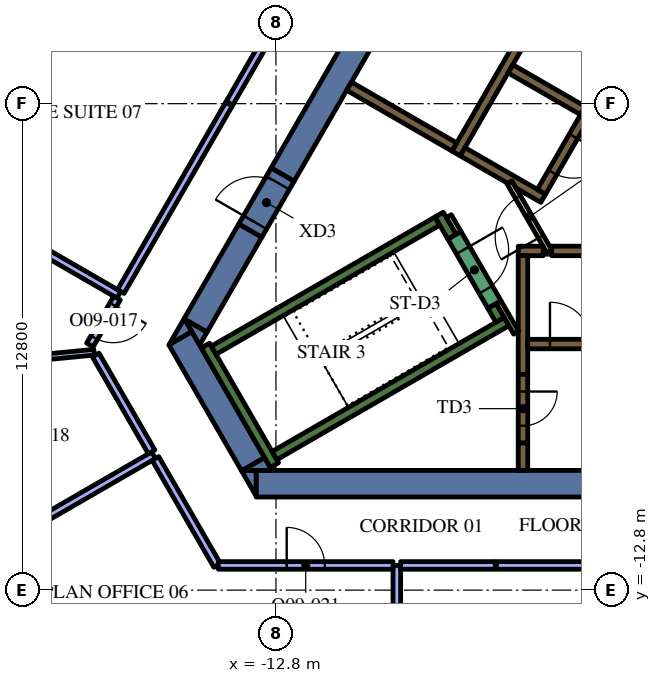
"""IFC4 building model, lengths in metres.
Left out: names, types, materials, properties, quantities, classifications, styles, units other than length and angle.
Written with IfcOpenShell. Run it as: python <this file> out.ifc"""

import sys

from ifc_helpers import new_model, si_unit, direction, frame, frame_2d, origin, place, context, subcontext, project, spatial, polyline, rectangle, outline, extrude, element, fill, save


model = new_model("IFC4")
c1 = context("Model", 3, precision=1e-05, world=origin(), true_north=direction((0.0, 1.0)))
c2 = subcontext(c1, "Body", "Model", "MODEL_VIEW")
j1 = project(units=[si_unit("LENGTHUNIT", "METRE"), si_unit("PLANEANGLEUNIT", "RADIAN")], contexts=[c1])
p1 = place(None, origin())
s1 = spatial("IfcSite", under=j1, at=p1, CompositionType="ELEMENT")
p2 = place(p1, origin())
s2 = spatial("IfcBuilding", under=s1, at=p2, CompositionType="ELEMENT")
p3 = place(p2, frame((0.0, 0.0, 239.4)))
s3 = spatial("IfcBuildingStorey", under=s2, at=p3, CompositionType="ELEMENT", Elevation=239.4)
p4 = place(p3, frame((8.904, -10.0, 0.0), z_axis=(0.0, 0.0, 1.0), x_axis=(-1.0, 0.0, 0.0)))
e1 = element("IfcWall", 1, at=p4, inside=s3, PredefinedType="SOLIDWALL", context=c2, shape_type="SweptSolid", body=[
    extrude(rectangle(XDim=22.226, YDim=0.7, at=frame_2d((11.113, 0.0))), origin(), (0.0, 0.0, 1.0), 4.2),
])
p5 = place(p3, origin())
e2 = element("IfcWall", 2, at=p5, inside=s3, PredefinedType="SOLIDWALL", context=c2, shape_type="SweptSolid", body=[
    extrude(outline(polyline([(-13.712, -9.65), (-13.324, -9.65), (-13.324, -10.322), (-13.712, -9.65)])), origin(), (0.0, 0.0, 1.0), 4.2),
])
p6 = place(p3, frame((-13.402, -9.487, 0.0), z_axis=(0.0, 0.0, 1.0), x_axis=(-0.500020498207, 0.866013568815, 0.0)))
e3 = element("IfcWall", 3, at=p6, inside=s3, PredefinedType="SOLIDWALL", context=c2, shape_type="SweptSolid", body=[
    extrude(rectangle(XDim=3.829, YDim=0.7, at=frame_2d((1.915, 0.0))), origin(), (0.0, 0.0, 1.0), 4.2),
])
e4 = element("IfcWall", 4, at=p5, inside=s3, PredefinedType="SOLIDWALL", context=c2, shape_type="SweptSolid", body=[
    extrude(outline(polyline([(-15.014, -5.995), (-15.611, -6.339), (-15.213, -5.65), (-15.014, -5.995)])), origin(), (0.0, 0.0, 1.0), 4.2),
])
e5 = element("IfcWall", 5, at=p5, inside=s3, PredefinedType="SOLIDWALL", context=c2, shape_type="SweptSolid", body=[
    extrude(outline(polyline([(-12.904, -9.65), (-13.68, -9.65), (-13.098, -9.314), (-12.904, -9.65)])), origin(), (0.0, 0.0, 1.0), 4.2),
])
p7 = place(p3, frame((-13.475, -3.339, 0.0), z_axis=(0.0, 0.0, 1.0), x_axis=(-0.499944726303, -0.866057313716, 0.0)))
e6 = element("IfcWall", 6, at=p7, inside=s3, PredefinedType="SOLIDWALL", context=c2, shape_type="SweptSolid", body=[
    extrude(rectangle(XDim=2.884, YDim=0.7, at=frame_2d((1.442, 0.0))), origin(), (0.0, 0.0, 1.0), 4.2),
])
e7 = element("IfcWall", 7, at=p5, inside=s3, PredefinedType="SOLIDWALL", context=c2, shape_type="SweptSolid", body=[
    extrude(outline(polyline([(-14.809, -6.35), (-15.197, -5.678), (-14.615, -6.014), (-14.809, -6.35)])), origin(), (0.0, 0.0, 1.0), 4.2),
])
p8 = place(p3, frame((-12.625, -1.867, 0.0), z_axis=(0.0, 0.0, 1.0), x_axis=(0.500008520515, 0.866020484407, 0.0)))
e8 = element("IfcWall", 8, at=p8, inside=s3, PredefinedType="SOLIDWALL", context=c2, shape_type="SweptSolid", body=[
    extrude(rectangle(XDim=15.859, YDim=0.7, at=frame_2d((7.929, 0.0))), origin(), (0.0, 0.0, 1.0), 4.2),
])
p9 = place(p3, frame((-12.84, -9.511, 0.0), z_axis=(0.0, 0.0, 1.0), x_axis=(-0.499997733992, 0.866026712061, 0.0)))
e9 = element("IfcWall", 9, at=p9, inside=s3, PredefinedType="SOLIDWALL", context=c2, shape_type="SweptSolid", body=[
    extrude(rectangle(XDim=3.634, YDim=0.25, at=frame_2d((1.817, 0.0))), origin(), (0.0, 0.0, 1.0), 4.2),
])
p10 = place(p3, frame((-14.44, -6.49, 0.0), z_axis=(0.0, 0.0, 1.0), x_axis=(0.866022966069, 0.500004222222, 0.0)))
e10 = element("IfcWall", 10, at=p10, inside=s3, PredefinedType="SOLIDWALL", context=c2, shape_type="SweptSolid", body=[
    extrude(rectangle(XDim=6.8, YDim=0.25, at=frame_2d((3.4, 0.0))), origin(), (0.0, 0.0, 1.0), 4.2),
])
p11 = place(p3, frame((-8.168, -3.503, 0.0), z_axis=(0.0, 0.0, 1.0), x_axis=(-0.499952099219, 0.866053057547, 0.0)))
e11 = element("IfcWall", 11, at=p11, inside=s3, PredefinedType="SOLIDWALL", context=c2, shape_type="SweptSolid", body=[
    extrude(rectangle(XDim=0.675, YDim=0.25, at=frame_2d((0.337, 0.0))), origin(), (0.0, 0.0, 1.0), 4.2),
])
p12 = place(p3, frame((-12.84, -9.261, 0.0), z_axis=(0.0, 0.0, 1.0), x_axis=(0.866016039709, 0.500016218704, 0.0)))
e12 = element("IfcWall", 12, at=p12, inside=s3, PredefinedType="SOLIDWALL", context=c2, shape_type="SweptSolid", body=[
    extrude(rectangle(XDim=7.05, YDim=0.25, at=frame_2d((3.525, 0.0))), origin(), (0.0, 0.0, 1.0), 4.2),
])
p13 = place(p3, frame((-6.905, -5.69, 0.0), z_axis=(0.0, 0.0, 1.0), x_axis=(-0.500402024738, 0.865793170242, 0.0)))
e13 = element("IfcWall", 13, at=p13, inside=s3, PredefinedType="SOLIDWALL", context=c2, shape_type="SweptSolid", body=[
    extrude(rectangle(XDim=0.425, YDim=0.25, at=frame_2d((0.212, 0.0))), origin(), (0.0, 0.0, 1.0), 4.2),
])
p14 = place(p3, frame((-6.3, -8.925, 0.0), z_axis=(0.0, 0.0, 1.0), x_axis=(0.0, -1.0, 0.0)))
e14 = element("IfcWall", 14, at=p14, inside=s3, PredefinedType="SOLIDWALL", context=c2, shape_type="SweptSolid", body=[
    extrude(rectangle(XDim=0.725, YDim=0.25, at=frame_2d((0.363, 0.0))), origin(), (0.0, 0.0, 1.0), 4.2),
])
p15 = place(p3, frame((-5.545, -3.875, 0.0), z_axis=(0.0, 0.0, 1.0), x_axis=(1.0, 0.0, 0.0)))
e15 = element("IfcWall", 15, at=p15, inside=s3, PredefinedType="SOLIDWALL", context=c2, shape_type="SweptSolid", body=[
    extrude(rectangle(XDim=11.97, YDim=0.25, at=frame_2d((5.985, 0.0))), origin(), (0.0, 0.0, 1.0), 4.2),
])
p16 = place(p3, frame((-6.425, -3.875, 0.0), z_axis=(0.0, 0.0, 1.0), x_axis=(1.0, 0.0, 0.0)))
e16 = element("IfcWall", 16, at=p16, inside=s3, PredefinedType="SOLIDWALL", context=c2, shape_type="SweptSolid", body=[
    extrude(rectangle(XDim=0.658, YDim=0.25, at=frame_2d((0.329, 0.0))), origin(), (0.0, 0.0, 1.0), 4.2),
])
p17 = place(p3, frame((-6.3, -7.125, 0.0), z_axis=(0.0, 0.0, 1.0), x_axis=(0.0, 1.0, 0.0)))
e17 = element("IfcWall", 17, at=p17, inside=s3, PredefinedType="SOLIDWALL", context=c2, shape_type="SweptSolid", body=[
    extrude(rectangle(XDim=3.125, YDim=0.25, at=frame_2d((1.562, 0.0))), origin(), (0.0, 0.0, 1.0), 4.2),
])
p18 = place(p3, frame((-8.06, -1.311, 0.0), z_axis=(0.0, 0.0, 1.0), x_axis=(0.50000273126, 0.866023826885, 0.0)))
e18 = element("IfcWall", 18, at=p18, inside=s3, PredefinedType="SOLIDWALL", context=c2, shape_type="SweptSolid", body=[
    extrude(rectangle(XDim=10.33, YDim=0.25, at=frame_2d((5.165, 0.0))), origin(), (0.0, 0.0, 1.0), 4.2),
])
p19 = place(p3, frame((-4.724, -0.182, 0.0), z_axis=(0.0, 0.0, 1.0), x_axis=(-0.866008176907, 0.50002983664, 0.0)))
e19 = element("IfcWall", 19, at=p19, inside=s3, PredefinedType="SOLIDWALL", context=c2, shape_type="SweptSolid", body=[
    extrude(rectangle(XDim=2.2, YDim=0.25, at=frame_2d((1.1, 0.0))), origin(), (0.0, 0.0, 1.0), 4.2),
])
e20 = element("IfcWall", 20, at=p5, inside=s3, PredefinedType="SOLIDWALL", context=c2, shape_type="SweptSolid", body=[
    extrude(outline(polyline([(-5.922, -2.257), (-5.922, -2.257), (-5.705, -2.382), (-5.83, -2.598), (-6.483, -2.221), (-6.591, -2.033), (-6.591, -2.033), (-6.7, -2.096), (-7.952, -1.373), (-7.827, -1.156), (-5.922, -2.257)])), origin(), (0.0, 0.0, 1.0), 4.2),
])
p20 = place(p3, frame((-8.106, -1.14, 0.0), z_axis=(0.0, 0.0, 1.0), x_axis=(-0.866008981251, 0.500028443584, 0.0)))
e21 = element("IfcWall", 21, at=p20, inside=s3, PredefinedType="SOLIDWALL", context=c2, shape_type="SweptSolid", body=[
    extrude(rectangle(XDim=3.2, YDim=0.25, at=frame_2d((1.6, 0.0))), origin(), (0.0, 0.0, 1.0), 4.2),
])
p21 = place(p3, frame((-8.252, -2.958, 0.0), z_axis=(0.0, 0.0, 1.0), x_axis=(0.500174715838, -0.865924508047, 0.0)))
e22 = element("IfcWall", 22, at=p21, inside=s3, PredefinedType="PARTITIONING", context=c2, shape_type="SweptSolid", body=[
    extrude(rectangle(XDim=0.514, YDim=0.15, at=frame_2d((0.257, 0.0))), origin(), (0.0, 0.0, 1.0), 3.45),
])
p22 = place(p3, frame((-6.48, -6.027, 0.0), z_axis=(0.0, 0.0, 1.0), x_axis=(-0.499927229454, 0.866067413802, 0.0)))
e23 = element("IfcWall", 23, at=p22, inside=s3, PredefinedType="PARTITIONING", context=c2, shape_type="SweptSolid", body=[
    extrude(rectangle(XDim=0.929, YDim=0.15, at=frame_2d((0.464, 0.0))), origin(), (0.0, 0.0, 1.0), 4.2),
])
p23 = place(p3, frame((-6.175, -6.325, 0.0), z_axis=(0.0, 0.0, 1.0), x_axis=(1.0, 0.0, 0.0)))
e24 = element("IfcWall", 24, at=p23, inside=s3, PredefinedType="SOLIDWALL", context=c2, shape_type="SweptSolid", body=[
    extrude(rectangle(XDim=12.35, YDim=0.25, at=frame_2d((6.175, 0.0))), origin(), (0.0, 0.0, 1.0), 4.2),
])
p24 = place(p23, frame((0.585, 0.0, 0.0)))
e25 = element("IfcOpeningElement", 25, at=p24, cuts=e24, PredefinedType="OPENING", context=c2, shape_type="SweptSolid", body=[
    extrude(rectangle(XDim=1.1, YDim=2.1, at=frame_2d((0.55, 1.05))), frame((0.0, 0.135, 0.0), z_axis=(0.0, -1.0, 0.0), x_axis=(1.0, 0.0, 0.0)), (0.0, 0.0, 1.0), 0.27),
])
p25 = place(p23, frame((3.105, 0.0, 0.0)))
e26 = element("IfcOpeningElement", 26, at=p25, cuts=e24, PredefinedType="OPENING", context=c2, shape_type="SweptSolid", body=[
    extrude(rectangle(XDim=1.1, YDim=2.1, at=frame_2d((0.55, 1.05))), frame((0.0, 0.135, 0.0), z_axis=(0.0, -1.0, 0.0), x_axis=(1.0, 0.0, 0.0)), (0.0, 0.0, 1.0), 0.27),
])
p26 = place(p23, frame((5.625, 0.0, 0.0)))
e27 = element("IfcOpeningElement", 27, at=p26, cuts=e24, PredefinedType="OPENING", context=c2, shape_type="SweptSolid", body=[
    extrude(rectangle(XDim=1.1, YDim=2.1, at=frame_2d((0.55, 1.05))), frame((0.0, 0.135, 0.0), z_axis=(0.0, -1.0, 0.0), x_axis=(1.0, 0.0, 0.0)), (0.0, 0.0, 1.0), 0.27),
])
p27 = place(p23, frame((8.145, 0.0, 0.0)))
e28 = element("IfcOpeningElement", 28, at=p27, cuts=e24, PredefinedType="OPENING", context=c2, shape_type="SweptSolid", body=[
    extrude(rectangle(XDim=1.1, YDim=2.1, at=frame_2d((0.55, 1.05))), frame((0.0, 0.135, 0.0), z_axis=(0.0, -1.0, 0.0), x_axis=(1.0, 0.0, 0.0)), (0.0, 0.0, 1.0), 0.27),
])
p28 = place(p23, frame((10.665, 0.0, 0.0)))
e29 = element("IfcOpeningElement", 29, at=p28, cuts=e24, PredefinedType="OPENING", context=c2, shape_type="SweptSolid", body=[
    extrude(rectangle(XDim=1.1, YDim=2.1, at=frame_2d((0.55, 1.05))), frame((0.0, 0.135, 0.0), z_axis=(0.0, -1.0, 0.0), x_axis=(1.0, 0.0, 0.0)), (0.0, 0.0, 1.0), 0.27),
])
p29 = place(p3, frame((-0.898, 6.194, 0.0), z_axis=(0.0, 0.0, 1.0), x_axis=(-0.499996202215, -0.866027596426, 0.0)))
e30 = element("IfcWall", 30, at=p29, inside=s3, PredefinedType="SOLIDWALL", context=c2, shape_type="SweptSolid", body=[
    extrude(rectangle(XDim=9.83, YDim=0.25, at=frame_2d((4.915, 0.0))), origin(), (0.0, 0.0, 1.0), 4.2),
])
p30 = place(p29, frame((0.585, 0.0, 0.0)))
e31 = element("IfcOpeningElement", 31, at=p30, cuts=e30, PredefinedType="OPENING", context=c2, shape_type="SweptSolid", body=[
    extrude(rectangle(XDim=1.1, YDim=2.1, at=frame_2d((0.55, 1.05))), frame((0.0, 0.135, 0.0), z_axis=(0.0, -1.0, 0.0), x_axis=(1.0, 0.0, 0.0)), (0.0, 0.0, 1.0), 0.27),
])
p31 = place(p29, frame((3.105, 0.0, 0.0)))
e32 = element("IfcOpeningElement", 32, at=p31, cuts=e30, PredefinedType="OPENING", context=c2, shape_type="SweptSolid", body=[
    extrude(rectangle(XDim=1.1, YDim=2.1, at=frame_2d((0.55, 1.05))), frame((0.0, 0.135, 0.0), z_axis=(0.0, -1.0, 0.0), x_axis=(1.0, 0.0, 0.0)), (0.0, 0.0, 1.0), 0.27),
])
p32 = place(p29, frame((5.625, 0.0, 0.0)))
e33 = element("IfcOpeningElement", 33, at=p32, cuts=e30, PredefinedType="OPENING", context=c2, shape_type="SweptSolid", body=[
    extrude(rectangle(XDim=1.1, YDim=2.1, at=frame_2d((0.55, 1.05))), frame((0.0, 0.135, 0.0), z_axis=(0.0, -1.0, 0.0), x_axis=(1.0, 0.0, 0.0)), (0.0, 0.0, 1.0), 0.27),
])
p33 = place(p29, frame((8.145, 0.0, 0.0)))
e34 = element("IfcOpeningElement", 34, at=p33, cuts=e30, PredefinedType="OPENING", context=c2, shape_type="SweptSolid", body=[
    extrude(rectangle(XDim=1.1, YDim=2.1, at=frame_2d((0.55, 1.05))), frame((0.0, 0.135, 0.0), z_axis=(0.0, -1.0, 0.0), x_axis=(1.0, 0.0, 0.0)), (0.0, 0.0, 1.0), 0.27),
])
p34 = place(p3, frame((-8.103, -3.466, 0.0), z_axis=(0.0, 0.0, 1.0), x_axis=(0.500078061341, -0.865980330357, 0.0)))
e35 = element("IfcWall", 35, at=p34, inside=s3, PredefinedType="SOLIDWALL", context=c2, shape_type="SweptSolid", body=[
    extrude(rectangle(XDim=2.1, YDim=0.4, at=frame_2d((1.05, 0.0))), origin(), (0.0, 0.0, 1.0), 4.2),
])
p35 = place(p34, frame((0.45, 0.0, 0.0)))
e36 = element("IfcOpeningElement", 36, at=p35, cuts=e35, PredefinedType="OPENING", context=c2, shape_type="SweptSolid", body=[
    extrude(rectangle(XDim=1.2, YDim=2.1, at=frame_2d((0.6, 1.05))), frame((0.0, 0.21, 0.0), z_axis=(0.0, -1.0, 0.0), x_axis=(1.0, 0.0, 0.0)), (0.0, 0.0, 1.0), 0.42),
])
p36 = place(p3, frame((-6.3, -7.125, 0.0), z_axis=(0.0, 0.0, 1.0), x_axis=(0.0, -1.0, 0.0)))
e37 = element("IfcWall", 37, at=p36, inside=s3, PredefinedType="SOLIDWALL", context=c2, shape_type="SweptSolid", body=[
    extrude(rectangle(XDim=1.8, YDim=0.25, at=frame_2d((0.9, 0.0))), origin(), (0.0, 0.0, 1.0), 4.2),
])
p37 = place(p36, frame((0.45, 0.0, 0.0)))
e38 = element("IfcOpeningElement", 38, at=p37, cuts=e37, PredefinedType="OPENING", context=c2, shape_type="SweptSolid", body=[
    extrude(rectangle(XDim=0.9, YDim=2.1, at=frame_2d((0.45, 1.05))), frame((0.0, 0.135, 0.0), z_axis=(0.0, -1.0, 0.0), x_axis=(1.0, 0.0, 0.0)), (0.0, 0.0, 1.0), 0.27),
])
p38 = place(p3, frame((-5.606, -3.89, 0.0), z_axis=(0.0, 0.0, 1.0), x_axis=(-0.500027713859, 0.866009402589, 0.0)))
e39 = element("IfcWall", 39, at=p38, inside=s3, PredefinedType="PARTITIONING", context=c2, shape_type="SweptSolid", body=[
    extrude(rectangle(XDim=2.1, YDim=0.15, at=frame_2d((1.05, 0.0))), origin(), (0.0, 0.0, 1.0), 3.45),
])
p39 = place(p38, frame((0.45, 0.0, 0.0)))
e40 = element("IfcOpeningElement", 40, at=p39, cuts=e39, PredefinedType="OPENING", context=c2, shape_type="SweptSolid", body=[
    extrude(rectangle(XDim=1.2, YDim=2.1, at=frame_2d((0.6, 1.05))), frame((0.0, 0.085, 0.0), z_axis=(0.0, -1.0, 0.0), x_axis=(1.0, 0.0, 0.0)), (0.0, 0.0, 1.0), 0.17),
])
p40 = place(p3, frame((-13.475, -3.339, 0.0), z_axis=(0.0, 0.0, 1.0), x_axis=(0.499954529098, 0.86605165483, 0.0)))
e41 = element("IfcWall", 41, at=p40, inside=s3, PredefinedType="SOLIDWALL", context=c2, shape_type="SweptSolid", body=[
    extrude(rectangle(XDim=1.7, YDim=0.7, at=frame_2d((0.85, 0.0))), origin(), (0.0, 0.0, 1.0), 4.2),
])
p41 = place(p40, frame((0.25, 0.0, 0.0)))
e42 = element("IfcOpeningElement", 42, at=p41, cuts=e41, PredefinedType="OPENING", context=c2, shape_type="SweptSolid", body=[
    extrude(rectangle(XDim=1.2, YDim=2.1, at=frame_2d((0.6, 1.05))), frame((0.0, 0.36, 0.0), z_axis=(0.0, -1.0, 0.0), x_axis=(1.0, 0.0, 0.0)), (0.0, 0.0, 1.0), 0.72),
])
p42 = place(p3, frame((-9.62, -15.654, 0.0), z_axis=(0.0, 0.0, 1.0), x_axis=(0.0, 1.0, 0.0)))
e43 = element("IfcWall", 43, at=p42, inside=s3, PredefinedType="PARTITIONING", context=c2, shape_type="SweptSolid", body=[
    extrude(rectangle(XDim=3.504, YDim=0.2, at=frame_2d((1.752, 0.0))), origin(), (0.0, 0.0, 1.0), 3.45),
])
p43 = place(p3, frame((-7.0, -12.15, 0.0), z_axis=(0.0, 0.0, 1.0), x_axis=(1.0, 0.0, 0.0)))
e44 = element("IfcWall", 44, at=p43, inside=s3, PredefinedType="PARTITIONING", context=c2, shape_type="SweptSolid", body=[
    extrude(rectangle(XDim=14.0, YDim=0.2, at=frame_2d((7.0, 0.0))), origin(), (0.0, 0.0, 1.0), 3.45),
])
p44 = place(p43, frame((6.5, 0.0, 0.0)))
e45 = element("IfcOpeningElement", 45, at=p44, cuts=e44, PredefinedType="OPENING", context=c2, shape_type="SweptSolid", body=[
    extrude(rectangle(XDim=1.0, YDim=2.1, at=frame_2d((0.5, 1.05))), frame((0.0, 0.11, 0.0), z_axis=(0.0, -1.0, 0.0), x_axis=(1.0, 0.0, 0.0)), (0.0, 0.0, 1.0), 0.22),
])
p45 = place(p3, frame((-9.52, -12.15, 0.0), z_axis=(0.0, 0.0, 1.0), x_axis=(1.0, 0.0, 0.0)))
e46 = element("IfcWall", 46, at=p45, inside=s3, PredefinedType="PARTITIONING", context=c2, shape_type="SweptSolid", body=[
    extrude(rectangle(XDim=2.49, YDim=0.2, at=frame_2d((1.245, 0.0))), origin(), (0.0, 0.0, 1.0), 3.45),
])
p46 = place(p3, frame((-16.934, -5.03, 0.0), z_axis=(0.0, 0.0, 1.0), x_axis=(-0.866031916153, 0.499988720078, 0.0)))
e47 = element("IfcWall", 47, at=p46, inside=s3, PredefinedType="PARTITIONING", context=c2, shape_type="SweptSolid", body=[
    extrude(rectangle(XDim=3.492, YDim=0.2, at=frame_2d((1.746, 0.0))), origin(), (0.0, 0.0, 1.0), 3.45),
])
p47 = place(p3, frame((-7.364, 11.545, 0.0), z_axis=(0.0, 0.0, 1.0), x_axis=(-0.500001759768, -0.86602438778, 0.0)))
e48 = element("IfcWall", 48, at=p47, inside=s3, PredefinedType="PARTITIONING", context=c2, shape_type="SweptSolid", body=[
    extrude(rectangle(XDim=13.317, YDim=0.2, at=frame_2d((6.658, 0.0))), origin(), (0.0, 0.0, 1.0), 3.45),
])
p48 = place(p47, frame((6.2, 0.0, 0.0)))
e49 = element("IfcOpeningElement", 49, at=p48, cuts=e48, PredefinedType="OPENING", context=c2, shape_type="SweptSolid", body=[
    extrude(rectangle(XDim=1.0, YDim=2.1, at=frame_2d((0.5, 1.05))), frame((0.0, 0.11, 0.0), z_axis=(0.0, -1.0, 0.0), x_axis=(1.0, 0.0, 0.0)), (0.0, 0.0, 1.0), 0.22),
])
p49 = place(p3, frame((-14.037, -0.013, 0.0), z_axis=(0.0, 0.0, 1.0), x_axis=(-0.500018205831, -0.866014892388, 0.0)))
e50 = element("IfcWall", 50, at=p49, inside=s3, PredefinedType="PARTITIONING", context=c2, shape_type="SweptSolid", body=[
    extrude(rectangle(XDim=5.693, YDim=0.2, at=frame_2d((2.846, 0.0))), origin(), (0.0, 0.0, 1.0), 3.45),
])
p50 = place(p3, frame((-17.586, -6.54, 0.0), z_axis=(0.0, 0.0, 1.0), x_axis=(-0.995356357863, -0.096258614479, 0.0)))
e51 = element("IfcWall", 51, at=p50, inside=s3, PredefinedType="PARTITIONING", context=c2, shape_type="SweptSolid", body=[
    extrude(rectangle(XDim=3.926, YDim=0.15, at=frame_2d((1.963, 0.0))), origin(), (0.0, 0.0, 1.0), 3.45),
])
p51 = place(p50, frame((1.3, 0.0, 0.0)))
e52 = element("IfcOpeningElement", 52, at=p51, cuts=e51, PredefinedType="OPENING", context=c2, shape_type="SweptSolid", body=[
    extrude(rectangle(XDim=0.9, YDim=2.1, at=frame_2d((0.45, 1.05))), frame((0.0, 0.085, 0.0), z_axis=(0.0, -1.0, 0.0), x_axis=(1.0, 0.0, 0.0)), (0.0, 0.0, 1.0), 0.17),
])
p52 = place(p3, frame((-16.983, -5.116, 0.0), z_axis=(0.0, 0.0, 1.0), x_axis=(-0.500009219579, -0.866020080793, 0.0)))
e53 = element("IfcWall", 53, at=p52, inside=s3, PredefinedType="PARTITIONING", context=c2, shape_type="SweptSolid", body=[
    extrude(rectangle(XDim=1.425, YDim=0.2, at=frame_2d((0.712, 0.0))), origin(), (0.0, 0.0, 1.0), 3.45),
])
p53 = place(p52, frame((0.2, 0.0, 0.0)))
e54 = element("IfcOpeningElement", 54, at=p53, cuts=e53, PredefinedType="OPENING", context=c2, shape_type="SweptSolid", body=[
    extrude(rectangle(XDim=1.0, YDim=2.1, at=frame_2d((0.5, 1.05))), frame((0.0, 0.11, 0.0), z_axis=(0.0, -1.0, 0.0), x_axis=(1.0, 0.0, 0.0)), (0.0, 0.0, 1.0), 0.22),
])
p54 = place(p3, frame((-16.021, -9.25, 0.0), z_axis=(0.0, 0.0, 1.0), x_axis=(-0.86602692059, -0.499997372806, 0.0)))
e55 = element("IfcWall", 55, at=p54, inside=s3, PredefinedType="PARTITIONING", context=c2, shape_type="SweptSolid", body=[
    extrude(rectangle(XDim=6.765, YDim=0.2, at=frame_2d((3.382, 0.0))), origin(), (0.0, 0.0, 1.0), 3.45),
])
p55 = place(p3, frame((-17.545, -6.612, 0.0), z_axis=(0.0, 0.0, 1.0), x_axis=(0.500006981563, -0.86602137294, 0.0)))
e56 = element("IfcWall", 56, at=p55, inside=s3, PredefinedType="PARTITIONING", context=c2, shape_type="SweptSolid", body=[
    extrude(rectangle(XDim=2.946, YDim=0.2, at=frame_2d((1.473, 0.0))), origin(), (0.0, 0.0, 1.0), 3.45),
])
p56 = place(p3, frame((-15.971, -9.337, 0.0), z_axis=(0.0, 0.0, 1.0), x_axis=(0.500010870188, -0.866019127788, 0.0)))
e57 = element("IfcWall", 57, at=p56, inside=s3, PredefinedType="PARTITIONING", context=c2, shape_type="SweptSolid", body=[
    extrude(rectangle(XDim=3.249, YDim=0.2, at=frame_2d((1.624, 0.0))), origin(), (0.0, 0.0, 1.0), 3.45),
])
p57 = place(p3, frame((-14.317, -12.15, 0.0), z_axis=(0.0, 0.0, 1.0), x_axis=(1.0, 0.0, 0.0)))
e58 = element("IfcWall", 58, at=p57, inside=s3, PredefinedType="PARTITIONING", context=c2, shape_type="SweptSolid", body=[
    extrude(rectangle(XDim=4.597, YDim=0.2, at=frame_2d((2.299, 0.0))), origin(), (0.0, 0.0, 1.0), 3.45),
])
p58 = place(p57, frame((1.8, 0.0, 0.0)))
e59 = element("IfcOpeningElement", 59, at=p58, cuts=e58, PredefinedType="OPENING", context=c2, shape_type="SweptSolid", body=[
    extrude(rectangle(XDim=1.0, YDim=2.1, at=frame_2d((0.5, 1.05))), frame((0.0, 0.11, 0.0), z_axis=(0.0, -1.0, 0.0), x_axis=(1.0, 0.0, 0.0)), (0.0, 0.0, 1.0), 0.22),
])
p59 = place(p24, origin())
e60 = element("IfcDoor", 60, at=p59, inside=s3, OperationType="DOUBLE_DOOR_SLIDING", PredefinedType="DOOR", context=c2, shape_type="SweptSolid", body=[
    extrude(rectangle(XDim=1.1, YDim=2.1, at=frame_2d((0.55, 1.05))), frame((0.0, 0.025, 0.0), z_axis=(0.0, -1.0, 0.0), x_axis=(1.0, 0.0, 0.0)), (0.0, 0.0, 1.0), 0.05),
])
fill(e25, e60)
p60 = place(p33, origin())
e61 = element("IfcDoor", 61, at=p60, inside=s3, OperationType="DOUBLE_DOOR_SLIDING", PredefinedType="DOOR", context=c2, shape_type="SweptSolid", body=[
    extrude(rectangle(XDim=1.1, YDim=2.1, at=frame_2d((0.55, 1.05))), frame((0.0, 0.025, 0.0), z_axis=(0.0, -1.0, 0.0), x_axis=(1.0, 0.0, 0.0)), (0.0, 0.0, 1.0), 0.05),
])
fill(e34, e61)
p61 = place(p35, origin())
e62 = element("IfcDoor", 62, at=p61, inside=s3, OperationType="SINGLE_SWING_LEFT", PredefinedType="DOOR", context=c2, shape_type="SweptSolid", body=[
    extrude(rectangle(XDim=1.2, YDim=2.1, at=frame_2d((0.6, 1.05))), frame((0.0, 0.025, 0.0), z_axis=(0.0, -1.0, 0.0), x_axis=(1.0, 0.0, 0.0)), (0.0, 0.0, 1.0), 0.05),
])
fill(e36, e62)
p62 = place(p37, origin())
e63 = element("IfcDoor", 63, at=p62, inside=s3, OperationType="SINGLE_SWING_LEFT", PredefinedType="DOOR", context=c2, shape_type="SweptSolid", body=[
    extrude(rectangle(XDim=0.9, YDim=2.1, at=frame_2d((0.45, 1.05))), frame((0.0, 0.025, 0.0), z_axis=(0.0, -1.0, 0.0), x_axis=(1.0, 0.0, 0.0)), (0.0, 0.0, 1.0), 0.05),
])
fill(e38, e63)
p63 = place(p39, origin())
e64 = element("IfcDoor", 64, at=p63, inside=s3, OperationType="SINGLE_SWING_LEFT", PredefinedType="DOOR", context=c2, shape_type="SweptSolid", body=[
    extrude(rectangle(XDim=1.2, YDim=2.1, at=frame_2d((0.6, 1.05))), frame((0.0, 0.025, 0.0), z_axis=(0.0, -1.0, 0.0), x_axis=(1.0, 0.0, 0.0)), (0.0, 0.0, 1.0), 0.05),
])
fill(e40, e64)
p64 = place(p41, origin())
e65 = element("IfcDoor", 65, at=p64, inside=s3, OperationType="SINGLE_SWING_LEFT", PredefinedType="DOOR", context=c2, shape_type="SweptSolid", body=[
    extrude(rectangle(XDim=1.2, YDim=2.1, at=frame_2d((0.6, 1.05))), frame((0.0, 0.025, 0.0), z_axis=(0.0, -1.0, 0.0), x_axis=(1.0, 0.0, 0.0)), (0.0, 0.0, 1.0), 0.05),
])
fill(e42, e65)
p65 = place(p53, origin())
e66 = element("IfcDoor", 66, at=p65, inside=s3, OperationType="SINGLE_SWING_LEFT", PredefinedType="DOOR", context=c2, shape_type="SweptSolid", body=[
    extrude(rectangle(XDim=1.0, YDim=2.1, at=frame_2d((0.5, 1.05))), frame((0.0, 0.025, 0.0), z_axis=(0.0, -1.0, 0.0), x_axis=(1.0, 0.0, 0.0)), (0.0, 0.0, 1.0), 0.05),
])
fill(e54, e66)
p66 = place(p58, origin())
e67 = element("IfcDoor", 67, at=p66, inside=s3, OperationType="SINGLE_SWING_RIGHT", PredefinedType="DOOR", context=c2, shape_type="SweptSolid", body=[
    extrude(rectangle(XDim=1.0, YDim=2.1, at=frame_2d((0.5, 1.05))), frame((0.0, 0.025, 0.0), z_axis=(0.0, -1.0, 0.0), x_axis=(1.0, 0.0, 0.0)), (0.0, 0.0, 1.0), 0.05),
])
fill(e59, e67)
save(model, sys.argv[1])
